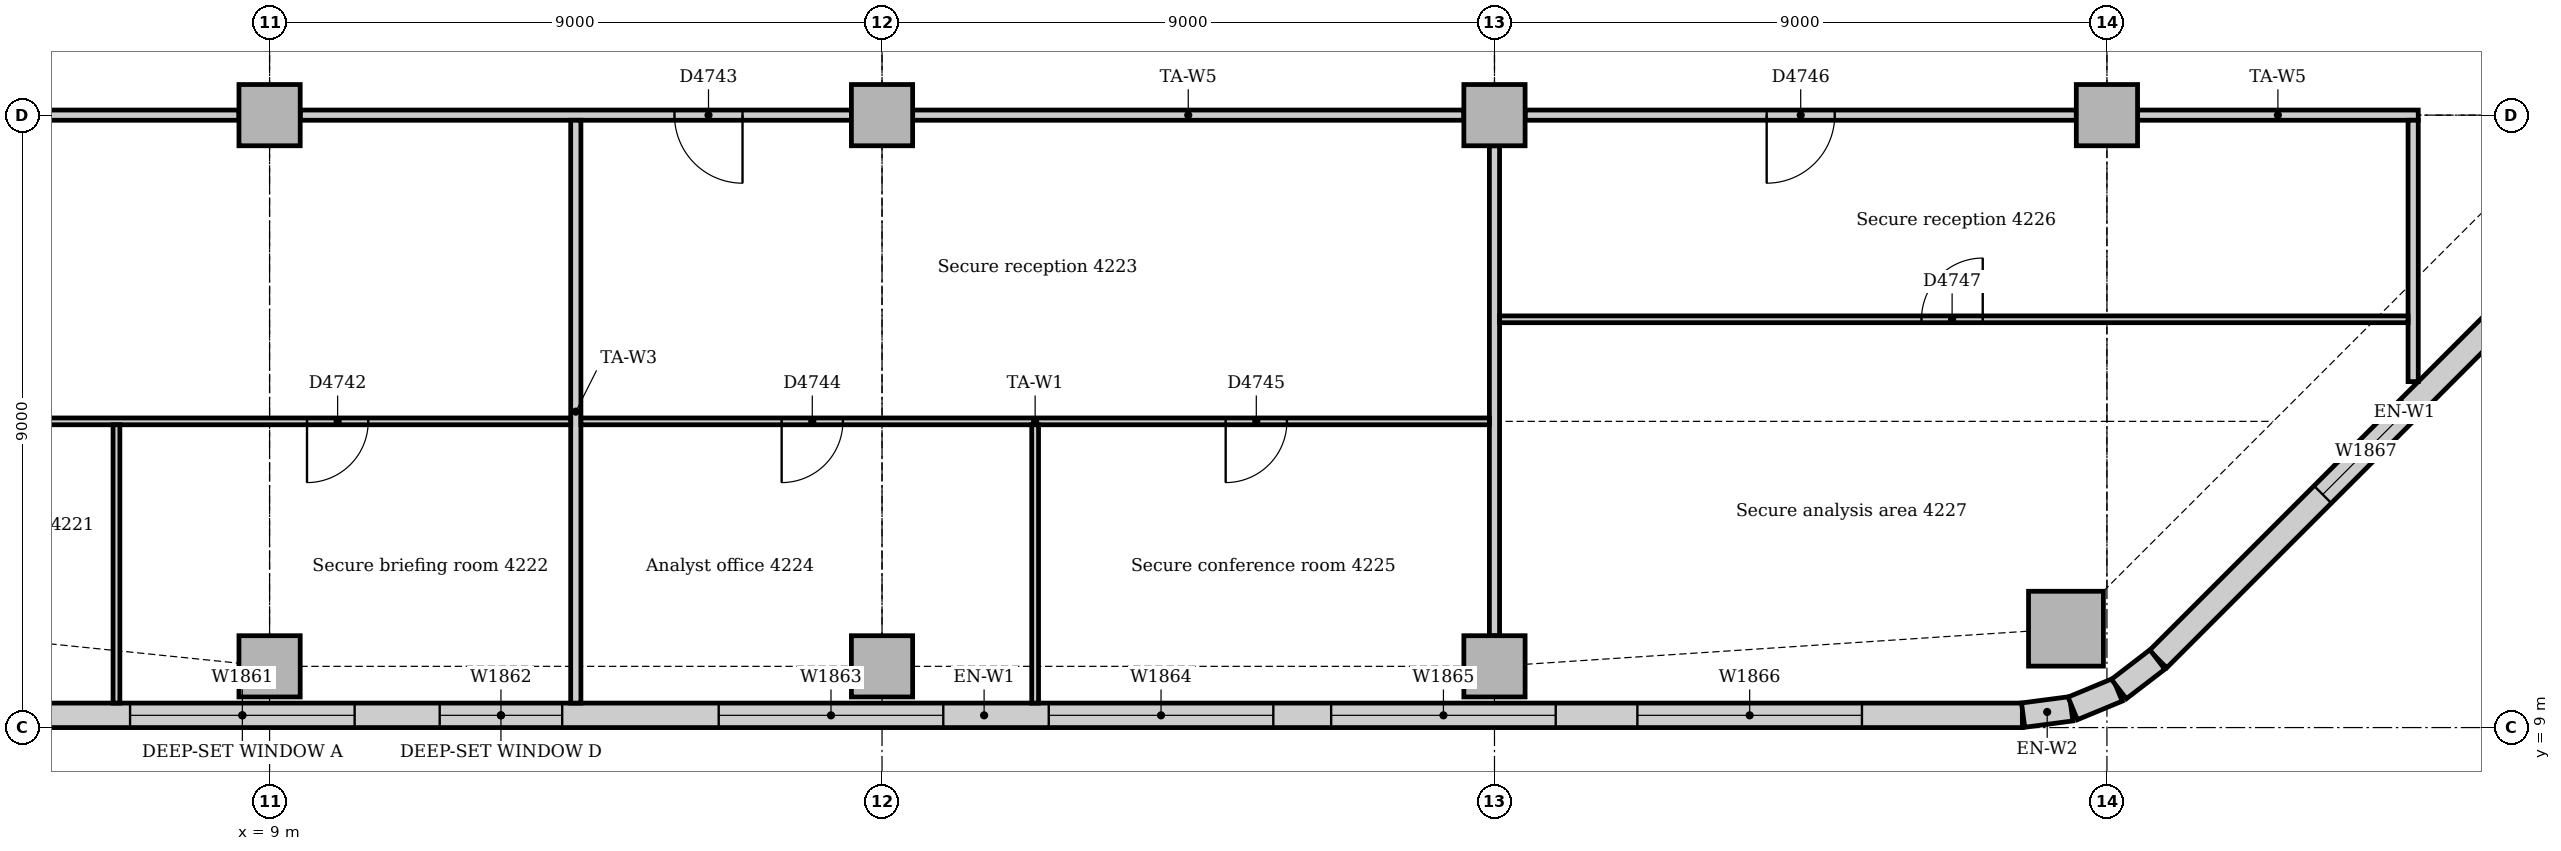
"""IFC4 building model, lengths in metres.
Left out: names, types, materials, properties, quantities, classifications, styles, units other than length and angle.
Written with IfcOpenShell. Run it as: python <this file> out.ifc"""

import sys

from ifc_helpers import new_model, si_unit, direction, frame, frame_2d, origin, origin_2d, place, context, subcontext, project, spatial, rectangle, extrude, element, fill, save


model = new_model("IFC4")
c1 = context("Model", 3, precision=1e-05, world=origin(), true_north=direction((0.0, 1.0)))
c2 = subcontext(c1, "Body", "Model", "MODEL_VIEW")
j1 = project(units=[si_unit("LENGTHUNIT", "METRE"), si_unit("PLANEANGLEUNIT", "RADIAN")], contexts=[c1])
p1 = place(None, origin())
s1 = spatial("IfcSite", under=j1, at=p1, CompositionType="ELEMENT")
p2 = place(p1, origin())
s2 = spatial("IfcBuilding", under=s1, at=p2, CompositionType="ELEMENT")
p3 = place(p2, frame((0.0, 0.0, 177.0)))
s3 = spatial("IfcBuildingStorey", under=s2, at=p3, CompositionType="ELEMENT", Elevation=177.0)
p4 = place(p3, frame((35.398, 10.453, 0.0), z_axis=(0.0, 0.0, 1.0), x_axis=(1.0, 0.0, 0.0)))
e1 = element("IfcColumn", 1, at=p4, inside=s3, PredefinedType="COLUMN", context=c2, shape_type="SweptSolid", body=[
    extrude(rectangle(XDim=1.1, YDim=1.1, at=origin_2d()), origin(), (0.0, 0.0, 1.0), 3.85),
])
for number, where, z_axis, x_axis in (
    (2, (9.0, 9.9, 0.0), (0.0, 0.0, 1.0), (1.0, 0.0, 0.0)),
    (3, (18.0, 9.9, 0.0), (0.0, 0.0, 1.0), (1.0, 0.0, 0.0)),
    (4, (27.0, 9.9, 0.0), (0.0, 0.0, 1.0), (1.0, 0.0, 0.0)),
    (5, (9.0, 18.0, 0.0), (0.0, 0.0, 1.0), (1.0, 0.0, 0.0)),
    (6, (18.0, 18.0, 0.0), (0.0, 0.0, 1.0), (1.0, 0.0, 0.0)),
    (7, (27.0, 18.0, 0.0), (0.0, 0.0, 1.0), (1.0, 0.0, 0.0)),
    (8, (36.0, 18.0, 0.0), (0.0, 0.0, 1.0), (1.0, 0.0, 0.0)),
):
    element("IfcColumn", number, at=place(p3, frame(where, z_axis=z_axis, x_axis=x_axis)), inside=s3, PredefinedType="COLUMN", context=c2, shape_type="SweptSolid", body=[
        extrude(rectangle(XDim=0.9, YDim=0.9, at=origin_2d()), origin(), (0.0, 0.0, 1.0), 3.85),
    ])
p5 = place(p3, frame((4.243, 9.18, 0.0), z_axis=(0.0, 0.0, 1.0), x_axis=(1.0, 0.0, 0.0)))
e9 = element("IfcWall", 9, at=p5, inside=s3, PredefinedType="STANDARD", context=c2, shape_type="SweptSolid", body=[
    extrude(rectangle(XDim=30.515, YDim=0.36, at=frame_2d((15.257, 0.0))), origin(), (0.0, 0.0, 1.0), 3.85),
])
p6 = place(p5, frame((2.707, 0.0, 0.9)))
e10 = element("IfcOpeningElement", 10, at=p6, cuts=e9, PredefinedType="OPENING", context=c2, shape_type="SweptSolid", body=[
    extrude(rectangle(XDim=3.3, YDim=1.6, at=frame_2d((1.65, 0.8))), frame((0.0, 0.19, 0.0), z_axis=(0.0, -1.0, 0.0), x_axis=(1.0, 0.0, 0.0)), (0.0, 0.0, 1.0), 0.38),
])
p7 = place(p5, frame((7.257, 0.0, 0.9)))
e11 = element("IfcOpeningElement", 11, at=p7, cuts=e9, PredefinedType="OPENING", context=c2, shape_type="SweptSolid", body=[
    extrude(rectangle(XDim=1.8, YDim=1.6, at=frame_2d((0.9, 0.8))), frame((0.0, 0.19, 0.0), z_axis=(0.0, -1.0, 0.0), x_axis=(1.0, 0.0, 0.0)), (0.0, 0.0, 1.0), 0.38),
])
p8 = place(p5, frame((11.357, 0.0, 0.9)))
e12 = element("IfcOpeningElement", 12, at=p8, cuts=e9, PredefinedType="OPENING", context=c2, shape_type="SweptSolid", body=[
    extrude(rectangle(XDim=3.3, YDim=1.6, at=frame_2d((1.65, 0.8))), frame((0.0, 0.19, 0.0), z_axis=(0.0, -1.0, 0.0), x_axis=(1.0, 0.0, 0.0)), (0.0, 0.0, 1.0), 0.38),
])
p9 = place(p5, frame((16.207, 0.0, 0.9)))
e13 = element("IfcOpeningElement", 13, at=p9, cuts=e9, PredefinedType="OPENING", context=c2, shape_type="SweptSolid", body=[
    extrude(rectangle(XDim=3.3, YDim=1.6, at=frame_2d((1.65, 0.8))), frame((0.0, 0.19, 0.0), z_axis=(0.0, -1.0, 0.0), x_axis=(1.0, 0.0, 0.0)), (0.0, 0.0, 1.0), 0.38),
])
p10 = place(p5, frame((20.357, 0.0, 0.9)))
e14 = element("IfcOpeningElement", 14, at=p10, cuts=e9, PredefinedType="OPENING", context=c2, shape_type="SweptSolid", body=[
    extrude(rectangle(XDim=3.3, YDim=1.6, at=frame_2d((1.65, 0.8))), frame((0.0, 0.19, 0.0), z_axis=(0.0, -1.0, 0.0), x_axis=(1.0, 0.0, 0.0)), (0.0, 0.0, 1.0), 0.38),
])
p11 = place(p5, frame((24.857, 0.0, 0.9)))
e15 = element("IfcOpeningElement", 15, at=p11, cuts=e9, PredefinedType="OPENING", context=c2, shape_type="SweptSolid", body=[
    extrude(rectangle(XDim=3.3, YDim=1.6, at=frame_2d((1.65, 0.8))), frame((0.0, 0.19, 0.0), z_axis=(0.0, -1.0, 0.0), x_axis=(1.0, 0.0, 0.0)), (0.0, 0.0, 1.0), 0.38),
])
p12 = place(p3, frame((36.751, 10.006, 0.0), z_axis=(0.0, 0.0, 1.0), x_axis=(0.707106781187, 0.707106781187, 0.0)))
e16 = element("IfcWall", 16, at=p12, inside=s3, PredefinedType="STANDARD", context=c2, shape_type="SweptSolid", body=[
    extrude(rectangle(XDim=10.243, YDim=0.36, at=frame_2d((5.121, 0.0))), origin(), (0.0, 0.0, 1.0), 3.85),
])
p13 = place(p12, frame((3.421, 0.0, 0.9)))
e17 = element("IfcOpeningElement", 17, at=p13, cuts=e16, PredefinedType="OPENING", context=c2, shape_type="SweptSolid", body=[
    extrude(rectangle(XDim=1.8, YDim=1.6, at=frame_2d((0.9, 0.8))), frame((0.0, 0.19, 0.0), z_axis=(0.0, -1.0, 0.0), x_axis=(1.0, 0.0, 0.0)), (0.0, 0.0, 1.0), 0.38),
])
for number, where, z_axis, x_axis in (
    (18, (34.769, 9.183, 0.0), (0.0, 0.0, 1.0), (0.991, 0.131, 0.0)),
    (19, (35.497, 9.282, 0.0), (0.0, 0.0, 1.0), (0.924, 0.383, 0.0)),
):
    element("IfcWall", number, at=place(p3, frame(where, z_axis=z_axis, x_axis=x_axis)), inside=s3, PredefinedType="STANDARD", context=c2, shape_type="SweptSolid", body=[
        extrude(rectangle(XDim=0.713, YDim=0.36, at=frame_2d((0.356, 0.0))), origin(), (0.0, 0.0, 1.0), 3.85),
    ])
p14 = place(p3, frame((36.175, 9.566, 0.0), z_axis=(0.0, 0.0, 1.0), x_axis=(0.793321924995, 0.608802368033, 0.0)))
e20 = element("IfcWall", 20, at=p14, inside=s3, PredefinedType="STANDARD", context=c2, shape_type="SweptSolid", body=[
    extrude(rectangle(XDim=0.713, YDim=0.36, at=frame_2d((0.357, 0.0))), origin(), (0.0, 0.0, 1.0), 3.85),
])
p15 = place(p3, frame((1.35, 18.0, 0.0), z_axis=(0.0, 0.0, 1.0), x_axis=(1.0, 0.0, 0.0)))
e21 = element("IfcWall", 21, at=p15, inside=s3, PredefinedType="PARTITIONING", context=c2, shape_type="SweptSolid", body=[
    extrude(rectangle(XDim=7.2, YDim=0.15, at=frame_2d((3.6, 0.0))), origin(), (0.0, 0.0, 1.0), 3.262),
])
p16 = place(p15, frame((3.1, 0.0, 0.0)))
e22 = element("IfcOpeningElement", 22, at=p16, cuts=e21, PredefinedType="OPENING", context=c2, shape_type="SweptSolid", body=[
    extrude(rectangle(XDim=1.0, YDim=2.1, at=frame_2d((0.5, 1.05))), frame((0.0, 0.085, 0.0), z_axis=(0.0, -1.0, 0.0), x_axis=(1.0, 0.0, 0.0)), (0.0, 0.0, 1.0), 0.17),
])
p17 = place(p3, frame((9.45, 18.0, 0.0), z_axis=(0.0, 0.0, 1.0), x_axis=(1.0, 0.0, 0.0)))
e23 = element("IfcWall", 23, at=p17, inside=s3, PredefinedType="PARTITIONING", context=c2, shape_type="SweptSolid", body=[
    extrude(rectangle(XDim=8.1, YDim=0.15, at=frame_2d((4.05, 0.0))), origin(), (0.0, 0.0, 1.0), 3.262),
])
p18 = place(p17, frame((5.5, 0.0, 0.0)))
e24 = element("IfcOpeningElement", 24, at=p18, cuts=e23, PredefinedType="OPENING", context=c2, shape_type="SweptSolid", body=[
    extrude(rectangle(XDim=1.0, YDim=2.1, at=frame_2d((0.5, 1.05))), frame((0.0, 0.085, 0.0), z_axis=(0.0, -1.0, 0.0), x_axis=(1.0, 0.0, 0.0)), (0.0, 0.0, 1.0), 0.17),
])
p19 = place(p3, frame((18.45, 18.0, 0.0), z_axis=(0.0, 0.0, 1.0), x_axis=(1.0, 0.0, 0.0)))
e25 = element("IfcWall", 25, at=p19, inside=s3, PredefinedType="PARTITIONING", context=c2, shape_type="SweptSolid", body=[
    extrude(rectangle(XDim=8.1, YDim=0.15, at=frame_2d((4.05, 0.0))), origin(), (0.0, 0.0, 1.0), 3.262),
])
p20 = place(p3, frame((27.45, 18.0, 0.0), z_axis=(0.0, 0.0, 1.0), x_axis=(1.0, 0.0, 0.0)))
e26 = element("IfcWall", 26, at=p20, inside=s3, PredefinedType="PARTITIONING", context=c2, shape_type="SweptSolid", body=[
    extrude(rectangle(XDim=8.1, YDim=0.15, at=frame_2d((4.05, 0.0))), origin(), (0.0, 0.0, 1.0), 3.262),
])
p21 = place(p20, frame((3.55, 0.0, 0.0)))
e27 = element("IfcOpeningElement", 27, at=p21, cuts=e26, PredefinedType="OPENING", context=c2, shape_type="SweptSolid", body=[
    extrude(rectangle(XDim=1.0, YDim=2.1, at=frame_2d((0.5, 1.05))), frame((0.0, 0.085, 0.0), z_axis=(0.0, -1.0, 0.0), x_axis=(1.0, 0.0, 0.0)), (0.0, 0.0, 1.0), 0.17),
])
p22 = place(p3, frame((36.45, 18.0, 0.0), z_axis=(0.0, 0.0, 1.0), x_axis=(1.0, 0.0, 0.0)))
e28 = element("IfcWall", 28, at=p22, inside=s3, PredefinedType="PARTITIONING", context=c2, shape_type="SweptSolid", body=[
    extrude(rectangle(XDim=4.125, YDim=0.15, at=frame_2d((2.062, 0.0))), origin(), (0.0, 0.0, 1.0), 3.35),
])
p23 = place(p3, frame((40.5, 14.084, 0.0), z_axis=(0.0, 0.0, 1.0), x_axis=(0.0, 1.0, 0.0)))
e29 = element("IfcWall", 29, at=p23, inside=s3, PredefinedType="PARTITIONING", context=c2, shape_type="SweptSolid", body=[
    extrude(rectangle(XDim=3.841, YDim=0.15, at=frame_2d((1.921, 0.0))), origin(), (0.0, 0.0, 1.0), 3.85),
])
p24 = place(p3, frame((13.5, 9.36, 0.0), z_axis=(0.0, 0.0, 1.0), x_axis=(0.0, 1.0, 0.0)))
e30 = element("IfcWall", 30, at=p24, inside=s3, PredefinedType="PARTITIONING", context=c2, shape_type="SweptSolid", body=[
    extrude(rectangle(XDim=8.565, YDim=0.15, at=frame_2d((4.282, 0.0))), origin(), (0.0, 0.0, 1.0), 3.85),
])
p25 = place(p3, frame((27.0, 10.35, 0.0), z_axis=(0.0, 0.0, 1.0), x_axis=(0.0, 1.0, 0.0)))
e31 = element("IfcWall", 31, at=p25, inside=s3, PredefinedType="PARTITIONING", context=c2, shape_type="SweptSolid", body=[
    extrude(rectangle(XDim=7.2, YDim=0.15, at=frame_2d((3.6, 0.0))), origin(), (0.0, 0.0, 1.0), 3.362),
])
p26 = place(p3, frame((13.575, 13.5, 0.0), z_axis=(0.0, 0.0, 1.0), x_axis=(1.0, 0.0, 0.0)))
e32 = element("IfcWall", 32, at=p26, inside=s3, PredefinedType="PARTITIONING", context=c2, shape_type="SweptSolid", body=[
    extrude(rectangle(XDim=13.35, YDim=0.1, at=frame_2d((6.675, 0.0))), origin(), (0.0, 0.0, 1.0), 3.4),
])
p27 = place(p26, frame((2.95, 0.0, 0.0)))
e33 = element("IfcOpeningElement", 33, at=p27, cuts=e32, PredefinedType="OPENING", context=c2, shape_type="SweptSolid", body=[
    extrude(rectangle(XDim=0.9, YDim=2.1, at=frame_2d((0.45, 1.05))), frame((0.0, 0.06, 0.0), z_axis=(0.0, -1.0, 0.0), x_axis=(1.0, 0.0, 0.0)), (0.0, 0.0, 1.0), 0.12),
])
p28 = place(p26, frame((9.475, 0.0, 0.0)))
e34 = element("IfcOpeningElement", 34, at=p28, cuts=e32, PredefinedType="OPENING", context=c2, shape_type="SweptSolid", body=[
    extrude(rectangle(XDim=0.9, YDim=2.1, at=frame_2d((0.45, 1.05))), frame((0.0, 0.06, 0.0), z_axis=(0.0, -1.0, 0.0), x_axis=(1.0, 0.0, 0.0)), (0.0, 0.0, 1.0), 0.12),
])
p29 = place(p3, frame((0.36, 13.5, 0.0), z_axis=(0.0, 0.0, 1.0), x_axis=(1.0, 0.0, 0.0)))
e35 = element("IfcWall", 35, at=p29, inside=s3, PredefinedType="PARTITIONING", context=c2, shape_type="SweptSolid", body=[
    extrude(rectangle(XDim=13.065, YDim=0.1, at=frame_2d((6.532, 0.0))), origin(), (0.0, 0.0, 1.0), 3.4),
])
p30 = place(p29, frame((2.8, 0.0, 0.0)))
e36 = element("IfcOpeningElement", 36, at=p30, cuts=e35, PredefinedType="OPENING", context=c2, shape_type="SweptSolid", body=[
    extrude(rectangle(XDim=0.9, YDim=2.1, at=frame_2d((0.45, 1.05))), frame((0.0, 0.06, 0.0), z_axis=(0.0, -1.0, 0.0), x_axis=(1.0, 0.0, 0.0)), (0.0, 0.0, 1.0), 0.12),
])
p31 = place(p29, frame((9.19, 0.0, 0.0)))
e37 = element("IfcOpeningElement", 37, at=p31, cuts=e35, PredefinedType="OPENING", context=c2, shape_type="SweptSolid", body=[
    extrude(rectangle(XDim=0.9, YDim=2.1, at=frame_2d((0.45, 1.05))), frame((0.0, 0.06, 0.0), z_axis=(0.0, -1.0, 0.0), x_axis=(1.0, 0.0, 0.0)), (0.0, 0.0, 1.0), 0.12),
])
p32 = place(p3, frame((27.075, 15.0, 0.0), z_axis=(0.0, 0.0, 1.0), x_axis=(1.0, 0.0, 0.0)))
e38 = element("IfcWall", 38, at=p32, inside=s3, PredefinedType="PARTITIONING", context=c2, shape_type="SweptSolid", body=[
    extrude(rectangle(XDim=13.35, YDim=0.1, at=frame_2d((6.675, 0.0))), origin(), (0.0, 0.0, 1.0), 3.85),
])
p33 = place(p32, frame((6.2, 0.0, 0.0)))
e39 = element("IfcOpeningElement", 39, at=p33, cuts=e38, PredefinedType="OPENING", context=c2, shape_type="SweptSolid", body=[
    extrude(rectangle(XDim=0.9, YDim=2.1, at=frame_2d((0.45, 1.05))), frame((0.0, 0.06, 0.0), z_axis=(0.0, -1.0, 0.0), x_axis=(1.0, 0.0, 0.0)), (0.0, 0.0, 1.0), 0.12),
])
for number, where, z_axis, x_axis in (
    (40, (6.75, 9.36, 0.0), (0.0, 0.0, 1.0), (0.0, 1.0, 0.0)),
    (41, (20.25, 9.36, 0.0), (0.0, 0.0, 1.0), (0.0, 1.0, 0.0)),
):
    element("IfcWall", number, at=place(p3, frame(where, z_axis=z_axis, x_axis=x_axis)), inside=s3, PredefinedType="PARTITIONING", context=c2, shape_type="SweptSolid", body=[
        extrude(rectangle(XDim=4.09, YDim=0.1, at=frame_2d((2.045, 0.0))), origin(), (0.0, 0.0, 1.0), 3.85),
    ])
p34 = place(p6, origin())
e42 = element("IfcWindow", 42, at=p34, inside=s3, PartitioningType="SINGLE_PANEL", PredefinedType="WINDOW", context=c2, shape_type="SweptSolid", body=[
    extrude(rectangle(XDim=3.3, YDim=1.6, at=frame_2d((1.65, 0.8))), frame((0.0, 0.13, 0.0), z_axis=(0.0, -1.0, 0.0), x_axis=(1.0, 0.0, 0.0)), (0.0, 0.0, 1.0), 0.06),
])
fill(e10, e42)
p35 = place(p7, origin())
e43 = element("IfcWindow", 43, at=p35, inside=s3, PartitioningType="SINGLE_PANEL", PredefinedType="WINDOW", context=c2, shape_type="SweptSolid", body=[
    extrude(rectangle(XDim=1.8, YDim=1.6, at=frame_2d((0.9, 0.8))), frame((0.0, 0.13, 0.0), z_axis=(0.0, -1.0, 0.0), x_axis=(1.0, 0.0, 0.0)), (0.0, 0.0, 1.0), 0.06),
])
fill(e11, e43)
p36 = place(p8, origin())
e44 = element("IfcWindow", 44, at=p36, inside=s3, PartitioningType="SINGLE_PANEL", PredefinedType="WINDOW", context=c2, shape_type="SweptSolid", body=[
    extrude(rectangle(XDim=3.3, YDim=1.6, at=frame_2d((1.65, 0.8))), frame((0.0, 0.13, 0.0), z_axis=(0.0, -1.0, 0.0), x_axis=(1.0, 0.0, 0.0)), (0.0, 0.0, 1.0), 0.06),
])
fill(e12, e44)
p37 = place(p9, origin())
e45 = element("IfcWindow", 45, at=p37, inside=s3, PartitioningType="SINGLE_PANEL", PredefinedType="WINDOW", context=c2, shape_type="SweptSolid", body=[
    extrude(rectangle(XDim=3.3, YDim=1.6, at=frame_2d((1.65, 0.8))), frame((0.0, 0.13, 0.0), z_axis=(0.0, -1.0, 0.0), x_axis=(1.0, 0.0, 0.0)), (0.0, 0.0, 1.0), 0.06),
])
fill(e13, e45)
p38 = place(p10, origin())
e46 = element("IfcWindow", 46, at=p38, inside=s3, PartitioningType="SINGLE_PANEL", PredefinedType="WINDOW", context=c2, shape_type="SweptSolid", body=[
    extrude(rectangle(XDim=3.3, YDim=1.6, at=frame_2d((1.65, 0.8))), frame((0.0, 0.13, 0.0), z_axis=(0.0, -1.0, 0.0), x_axis=(1.0, 0.0, 0.0)), (0.0, 0.0, 1.0), 0.06),
])
fill(e14, e46)
p39 = place(p11, origin())
e47 = element("IfcWindow", 47, at=p39, inside=s3, PartitioningType="SINGLE_PANEL", PredefinedType="WINDOW", context=c2, shape_type="SweptSolid", body=[
    extrude(rectangle(XDim=3.3, YDim=1.6, at=frame_2d((1.65, 0.8))), frame((0.0, 0.13, 0.0), z_axis=(0.0, -1.0, 0.0), x_axis=(1.0, 0.0, 0.0)), (0.0, 0.0, 1.0), 0.06),
])
fill(e15, e47)
p40 = place(p13, origin())
e48 = element("IfcWindow", 48, at=p40, inside=s3, PartitioningType="SINGLE_PANEL", PredefinedType="WINDOW", context=c2, shape_type="SweptSolid", body=[
    extrude(rectangle(XDim=1.8, YDim=1.6, at=frame_2d((0.9, 0.8))), frame((0.0, 0.13, 0.0), z_axis=(0.0, -1.0, 0.0), x_axis=(1.0, 0.0, 0.0)), (0.0, 0.0, 1.0), 0.06),
])
fill(e17, e48)
p41 = place(p31, frame((0.9, 0.0, 0.0), z_axis=(0.0, 0.0, 1.0), x_axis=(-1.0, 0.0, 0.0)))
e49 = element("IfcDoor", 49, at=p41, inside=s3, OperationType="SINGLE_SWING_RIGHT", PredefinedType="DOOR", context=c2, shape_type="SweptSolid", body=[
    extrude(rectangle(XDim=0.9, YDim=2.1, at=frame_2d((0.45, 1.05))), frame((0.0, 0.025, 0.0), z_axis=(0.0, -1.0, 0.0), x_axis=(1.0, 0.0, 0.0)), (0.0, 0.0, 1.0), 0.05),
])
fill(e37, e49)
p42 = place(p18, frame((1.0, 0.0, 0.0), z_axis=(0.0, 0.0, 1.0), x_axis=(-1.0, 0.0, 0.0)))
e50 = element("IfcDoor", 50, at=p42, inside=s3, OperationType="SINGLE_SWING_LEFT", PredefinedType="DOOR", context=c2, shape_type="SweptSolid", body=[
    extrude(rectangle(XDim=1.0, YDim=2.1, at=frame_2d((0.5, 1.05))), frame((0.0, 0.025, 0.0), z_axis=(0.0, -1.0, 0.0), x_axis=(1.0, 0.0, 0.0)), (0.0, 0.0, 1.0), 0.05),
])
fill(e24, e50)
p43 = place(p27, frame((0.9, 0.0, 0.0), z_axis=(0.0, 0.0, 1.0), x_axis=(-1.0, 0.0, 0.0)))
e51 = element("IfcDoor", 51, at=p43, inside=s3, OperationType="SINGLE_SWING_RIGHT", PredefinedType="DOOR", context=c2, shape_type="SweptSolid", body=[
    extrude(rectangle(XDim=0.9, YDim=2.1, at=frame_2d((0.45, 1.05))), frame((0.0, 0.025, 0.0), z_axis=(0.0, -1.0, 0.0), x_axis=(1.0, 0.0, 0.0)), (0.0, 0.0, 1.0), 0.05),
])
fill(e33, e51)
p44 = place(p28, frame((0.9, 0.0, 0.0), z_axis=(0.0, 0.0, 1.0), x_axis=(-1.0, 0.0, 0.0)))
e52 = element("IfcDoor", 52, at=p44, inside=s3, OperationType="SINGLE_SWING_RIGHT", PredefinedType="DOOR", context=c2, shape_type="SweptSolid", body=[
    extrude(rectangle(XDim=0.9, YDim=2.1, at=frame_2d((0.45, 1.05))), frame((0.0, 0.025, 0.0), z_axis=(0.0, -1.0, 0.0), x_axis=(1.0, 0.0, 0.0)), (0.0, 0.0, 1.0), 0.05),
])
fill(e34, e52)
p45 = place(p21, frame((1.0, 0.0, 0.0), z_axis=(0.0, 0.0, 1.0), x_axis=(-1.0, 0.0, 0.0)))
e53 = element("IfcDoor", 53, at=p45, inside=s3, OperationType="SINGLE_SWING_RIGHT", PredefinedType="DOOR", context=c2, shape_type="SweptSolid", body=[
    extrude(rectangle(XDim=1.0, YDim=2.1, at=frame_2d((0.5, 1.05))), frame((0.0, 0.025, 0.0), z_axis=(0.0, -1.0, 0.0), x_axis=(1.0, 0.0, 0.0)), (0.0, 0.0, 1.0), 0.05),
])
fill(e27, e53)
p46 = place(p33, origin())
e54 = element("IfcDoor", 54, at=p46, inside=s3, OperationType="SINGLE_SWING_RIGHT", PredefinedType="DOOR", context=c2, shape_type="SweptSolid", body=[
    extrude(rectangle(XDim=0.9, YDim=2.1, at=frame_2d((0.45, 1.05))), frame((0.0, 0.025, 0.0), z_axis=(0.0, -1.0, 0.0), x_axis=(1.0, 0.0, 0.0)), (0.0, 0.0, 1.0), 0.05),
])
fill(e39, e54)
save(model, sys.argv[1])
